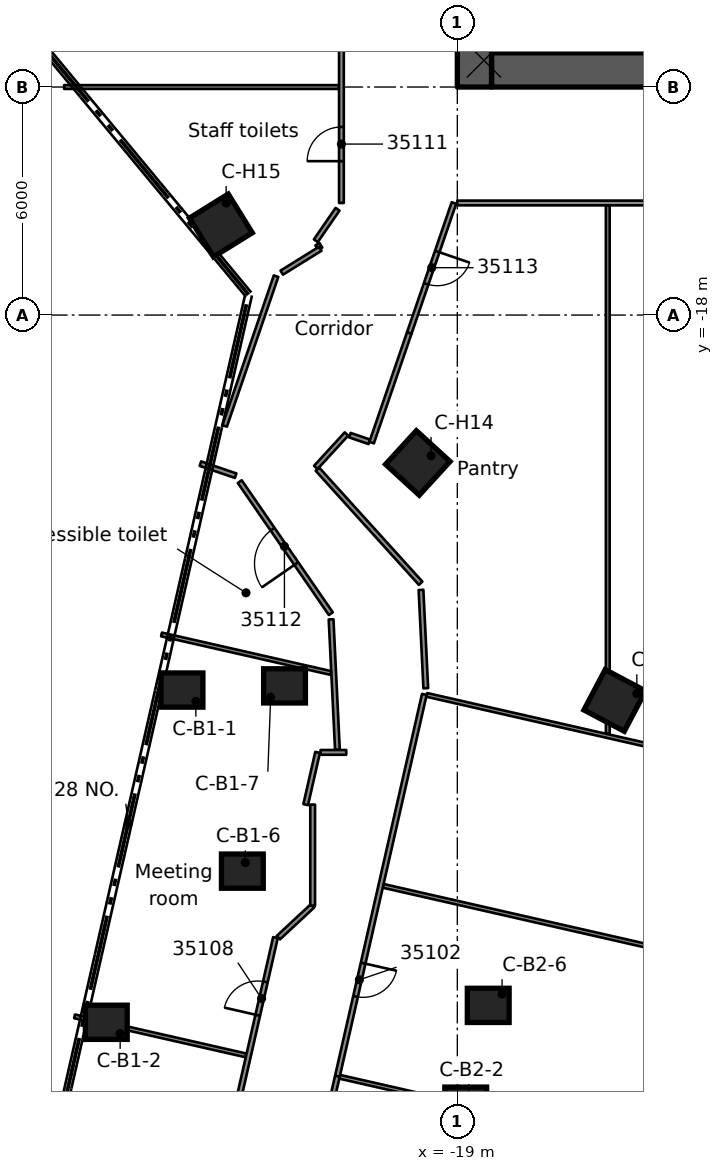
"""IFC4 building model, lengths in metres.
Left out: names, types, materials, properties, quantities, classifications, styles, units other than length and angle.
Written with IfcOpenShell. Run it as: python <this file> out.ifc"""

import sys

from ifc_helpers import new_model, si_unit, direction, frame, frame_2d, origin, origin_2d, place, context, subcontext, project, spatial, rectangle, extrude, element, fill, save


model = new_model("IFC4")
c1 = context("Model", 3, precision=1e-05, world=origin(), true_north=direction((0.0, 1.0)))
c2 = subcontext(c1, "Body", "Model", "MODEL_VIEW")
j1 = project(units=[si_unit("LENGTHUNIT", "METRE"), si_unit("PLANEANGLEUNIT", "RADIAN")], contexts=[c1])
p1 = place(None, origin())
s1 = spatial("IfcSite", under=j1, at=p1, CompositionType="ELEMENT")
p2 = place(p1, origin())
s2 = spatial("IfcBuilding", under=s1, at=p2, CompositionType="ELEMENT")
p3 = place(p2, frame((0.0, 0.0, 170.6)))
s3 = spatial("IfcBuildingStorey", under=s2, at=p3, CompositionType="ELEMENT", Elevation=170.6)
p4 = place(p3, frame((-18.1, -11.55, 0.0), z_axis=(0.0, 0.0, 1.0), x_axis=(1.0, 0.0, 0.0)))
e1 = element("IfcWall", 1, at=p4, inside=s3, PredefinedType="SHEAR", context=c2, shape_type="SweptSolid", body=[
    extrude(rectangle(XDim=9.2, YDim=0.9, at=frame_2d((4.6, 0.0))), origin(), (0.0, 0.0, 1.0), 3.5),
])
p5 = place(p4, frame((5.1, 0.0, 0.0)))
e2 = element("IfcOpeningElement", 2, at=p5, cuts=e1, PredefinedType="OPENING", context=c2, shape_type="SweptSolid", body=[
    extrude(rectangle(XDim=1.1, YDim=2.1, at=frame_2d((0.55, 1.05))), frame((0.0, 0.46, 0.0), z_axis=(0.0, -1.0, 0.0), x_axis=(1.0, 0.0, 0.0)), (0.0, 0.0, 1.0), 0.92),
])
p6 = place(p4, frame((7.53, 0.0, 0.0)))
e3 = element("IfcOpeningElement", 3, at=p6, cuts=e1, PredefinedType="OPENING", context=c2, shape_type="SweptSolid", body=[
    extrude(rectangle(XDim=0.9, YDim=2.1, at=frame_2d((0.45, 1.05))), frame((0.0, 0.46, 0.0), z_axis=(0.0, -1.0, 0.0), x_axis=(1.0, 0.0, 0.0)), (0.0, 0.0, 1.0), 0.92),
])
p7 = place(p3, frame((-18.55, -12.0, 0.0), z_axis=(0.0, 0.0, 1.0), x_axis=(0.0, 1.0, 0.0)))
e4 = element("IfcWall", 4, at=p7, inside=s3, PredefinedType="SHEAR", context=c2, shape_type="SweptSolid", body=[
    extrude(rectangle(XDim=24.0, YDim=0.9, at=frame_2d((12.0, 0.0))), origin(), (0.0, 0.0, 1.0), 3.5),
])
p8 = place(p7, frame((10.1, 0.0, 0.0)))
e5 = element("IfcOpeningElement", 5, at=p8, cuts=e4, PredefinedType="OPENING", context=c2, shape_type="SweptSolid", body=[
    extrude(rectangle(XDim=1.8, YDim=2.1, at=frame_2d((0.9, 1.05))), frame((0.0, 0.46, 0.0), z_axis=(0.0, -1.0, 0.0), x_axis=(1.0, 0.0, 0.0)), (0.0, 0.0, 1.0), 0.92),
])
for number, where, z_axis, x_axis in (
    (6, (-26.245, -27.867, 0.0), (0.0, 0.0, 1.0), (1.0, 0.0, 0.0)),
    (7, (-28.237, -36.609, 0.0), (0.0, 0.0, 1.0), (1.0, 0.0, 0.0)),
    (8, (-24.657, -32.632, 0.0), (0.0, 0.0, 1.0), (1.0, 0.0, 0.0)),
    (9, (-23.547, -27.757, 0.0), (0.0, 0.0, 1.0), (1.0, 0.0, 0.0)),
    (10, (-18.779, -38.764, 0.0), (0.0, 0.0, 1.0), (1.0, 0.0, 0.0)),
    (11, (-18.187, -36.164, 0.0), (0.0, 0.0, 1.0), (1.0, 0.0, 0.0)),
):
    element("IfcColumn", number, at=place(p3, frame(where, z_axis=z_axis, x_axis=x_axis)), inside=s3, PredefinedType="COLUMN", context=c2, shape_type="SweptSolid", body=[
        extrude(rectangle(XDim=1.1, YDim=0.9, at=origin_2d()), origin(), (0.0, 0.0, 1.0), 3.5),
    ])
for number, where, z_axis, x_axis in (
    (12, (-14.858, -28.141, 0.0), (0.0, 0.0, 1.0), (-0.467, -0.884, 0.0)),
    (13, (-20.04, -21.891, 0.0), (0.0, 0.0, 1.0), (-0.675, -0.738, 0.0)),
    (14, (-25.222, -15.642, 0.0), (0.0, 0.0, 1.0), (-0.85, -0.527, 0.0)),
):
    element("IfcColumn", number, at=place(p3, frame(where, z_axis=z_axis, x_axis=x_axis)), inside=s3, PredefinedType="COLUMN", context=c2, shape_type="SweptSolid", body=[
        extrude(rectangle(XDim=1.2, YDim=1.2, at=origin_2d()), origin(), (0.0, 0.0, 1.0), 3.5),
    ])
p9 = place(p3, frame((-22.322, -26.007, 0.0), z_axis=(0.0, 0.0, 1.0), x_axis=(0.048573949442, -0.998819589033, 0.0)))
e15 = element("IfcWall", 15, at=p9, inside=s3, PredefinedType="PARTITIONING", context=c2, shape_type="SweptSolid", body=[
    extrude(rectangle(XDim=3.438, YDim=0.125, at=frame_2d((1.719, 0.0))), origin(), (0.0, 0.0, 1.0), 3.06),
])
p10 = place(p3, frame((-19.956, -25.232, 0.0), z_axis=(0.0, 0.0, 1.0), x_axis=(0.048635402931, -0.998816598571, 0.0)))
e16 = element("IfcWall", 16, at=p10, inside=s3, PredefinedType="PARTITIONING", context=c2, shape_type="SweptSolid", body=[
    extrude(rectangle(XDim=2.59, YDim=0.125, at=frame_2d((1.295, 0.0))), origin(), (0.0, 0.0, 1.0), 3.06),
])
p11 = place(p3, frame((-22.682, -16.135, 0.0), z_axis=(0.0, 0.0, 1.0), x_axis=(0.530154156877, -0.847901273702, 0.0)))
e17 = element("IfcWall", 17, at=p11, inside=s3, PredefinedType="PARTITIONING", context=c2, shape_type="SweptSolid", body=[
    extrude(rectangle(XDim=0.141, YDim=0.125, at=frame_2d((0.071, 0.0))), origin(), (0.0, 0.0, 1.0), 3.06),
])
p12 = place(p3, frame((-22.329, -25.857, 0.0), z_axis=(0.0, 0.0, 1.0), x_axis=(-0.567768105219, 0.823188543832, 0.0)))
e18 = element("IfcWall", 18, at=p12, inside=s3, PredefinedType="PARTITIONING", context=c2, shape_type="SweptSolid", body=[
    extrude(rectangle(XDim=4.22, YDim=0.125, at=frame_2d((2.11, 0.0))), origin(), (0.0, 0.0, 1.0), 3.06),
])
p13 = place(p12, frame((1.6, 0.0, 0.0)))
e19 = element("IfcOpeningElement", 19, at=p13, cuts=e18, PredefinedType="OPENING", context=c2, shape_type="SweptSolid", body=[
    extrude(rectangle(XDim=1.1, YDim=2.1, at=frame_2d((0.55, 1.05))), frame((0.0, 0.073, 0.0), z_axis=(0.0, -1.0, 0.0), x_axis=(1.0, 0.0, 0.0)), (0.0, 0.0, 1.0), 0.145),
])
p14 = place(p3, frame((-19.965, -25.057, 0.0), z_axis=(0.0, 0.0, 1.0), x_axis=(-0.671014368504, 0.741444345356, 0.0)))
e20 = element("IfcWall", 20, at=p14, inside=s3, PredefinedType="PARTITIONING", context=c2, shape_type="SweptSolid", body=[
    extrude(rectangle(XDim=4.049, YDim=0.125, at=frame_2d((2.024, 0.0))), origin(), (0.0, 0.0, 1.0), 3.06),
])
p15 = place(p3, frame((-21.827, -21.16, 0.0), z_axis=(0.0, 0.0, 1.0), x_axis=(0.94566493533, -0.325142784155, 0.0)))
e21 = element("IfcWall", 21, at=p15, inside=s3, PredefinedType="PARTITIONING", context=c2, shape_type="SweptSolid", body=[
    extrude(rectangle(XDim=0.541, YDim=0.125, at=frame_2d((0.271, 0.0))), origin(), (0.0, 0.0, 1.0), 3.06),
])
p16 = place(p3, frame((-25.76, -21.91, 0.0), z_axis=(0.0, 0.0, 1.0), x_axis=(0.946161976611, -0.323693549544, 0.0)))
e22 = element("IfcWall", 22, at=p16, inside=s3, PredefinedType="PARTITIONING", context=c2, shape_type="SweptSolid", body=[
    extrude(rectangle(XDim=0.98, YDim=0.125, at=frame_2d((0.49, 0.0))), origin(), (0.0, 0.0, 1.0), 3.06),
])
p17 = place(p3, frame((-29.073, -36.453, 0.0), z_axis=(0.0, 0.0, 1.0), x_axis=(0.975041099452, -0.222024445455, 0.0)))
e23 = element("IfcWall", 23, at=p17, inside=s3, PredefinedType="PARTITIONING", context=c2, shape_type="SweptSolid", body=[
    extrude(rectangle(XDim=4.63, YDim=0.1, at=frame_2d((2.315, 0.0))), origin(), (0.0, 0.0, 1.0), 3.06),
])
p18 = place(p3, frame((-22.095, -38.043, 0.0), z_axis=(0.0, 0.0, 1.0), x_axis=(0.975023843859, -0.222100211404, 0.0)))
e24 = element("IfcWall", 24, at=p18, inside=s3, PredefinedType="PARTITIONING", context=c2, shape_type="SweptSolid", body=[
    extrude(rectangle(XDim=26.186, YDim=0.1, at=frame_2d((13.093, 0.0))), origin(), (0.0, 0.0, 1.0), 3.06),
])
p19 = place(p3, frame((-20.951, -33.019, 0.0), z_axis=(0.0, 0.0, 1.0), x_axis=(0.975025683381, -0.222092135715, 0.0)))
e25 = element("IfcWall", 25, at=p19, inside=s3, PredefinedType="PARTITIONING", context=c2, shape_type="SweptSolid", body=[
    extrude(rectangle(XDim=26.187, YDim=0.1, at=frame_2d((13.094, 0.0))), origin(), (0.0, 0.0, 1.0), 3.06),
])
p20 = place(p3, frame((-26.784, -26.404, 0.0), z_axis=(0.0, 0.0, 1.0), x_axis=(0.975064044209, -0.221923657346, 0.0)))
e26 = element("IfcWall", 26, at=p20, inside=s3, PredefinedType="PARTITIONING", context=c2, shape_type="SweptSolid", body=[
    extrude(rectangle(XDim=4.569, YDim=0.1, at=frame_2d((2.284, 0.0))), origin(), (0.0, 0.0, 1.0), 3.06),
])
p21 = place(p3, frame((-19.806, -27.994, 0.0), z_axis=(0.0, 0.0, 1.0), x_axis=(0.975005878079, -0.222179066769, 0.0)))
e27 = element("IfcWall", 27, at=p21, inside=s3, PredefinedType="PARTITIONING", context=c2, shape_type="SweptSolid", body=[
    extrude(rectangle(XDim=25.246, YDim=0.1, at=frame_2d((12.623, 0.0))), origin(), (0.0, 0.0, 1.0), 3.06),
])
p22 = place(p3, frame((-23.709, -34.381, 0.0), z_axis=(0.0, 0.0, 1.0), x_axis=(0.732207421562, 0.681081707147, 0.0)))
e28 = element("IfcWall", 28, at=p22, inside=s3, PredefinedType="PARTITIONING", context=c2, shape_type="SweptSolid", body=[
    extrude(rectangle(XDim=1.232, YDim=0.125, at=frame_2d((0.616, 0.0))), origin(), (0.0, 0.0, 1.0), 3.06),
])
p23 = place(p3, frame((-22.599, -29.507, 0.0), z_axis=(0.0, 0.0, 1.0), x_axis=(1.0, 0.0, 0.0)))
e29 = element("IfcWall", 29, at=p23, inside=s3, PredefinedType="PARTITIONING", context=c2, shape_type="SweptSolid", body=[
    extrude(rectangle(XDim=0.676, YDim=0.125, at=frame_2d((0.338, 0.0))), origin(), (0.0, 0.0, 1.0), 3.06),
])
p24 = place(p3, frame((-10.991, -15.051, 0.0), z_axis=(0.0, 0.0, 1.0), x_axis=(-1.0, 0.0, 0.0)))
e30 = element("IfcWall", 30, at=p24, inside=s3, PredefinedType="PARTITIONING", context=c2, shape_type="SweptSolid", body=[
    extrude(rectangle(XDim=8.01, YDim=0.125, at=frame_2d((4.005, 0.0))), origin(), (0.0, 0.0, 1.0), 3.06),
])
p25 = place(p24, frame((1.6, 0.0, 0.0)))
e31 = element("IfcOpeningElement", 31, at=p25, cuts=e30, PredefinedType="OPENING", context=c2, shape_type="SweptSolid", body=[
    extrude(rectangle(XDim=0.9, YDim=2.1, at=frame_2d((0.45, 1.05))), frame((0.0, 0.073, 0.0), z_axis=(0.0, -1.0, 0.0), x_axis=(1.0, 0.0, 0.0)), (0.0, 0.0, 1.0), 0.145),
])
p26 = place(p3, frame((-29.347, -12.0, 0.0), z_axis=(0.0, 0.0, 1.0), x_axis=(1.0, 0.0, 0.0)))
e32 = element("IfcWall", 32, at=p26, inside=s3, PredefinedType="PARTITIONING", context=c2, shape_type="SweptSolid", body=[
    extrude(rectangle(XDim=7.234, YDim=0.1, at=frame_2d((3.617, 0.0))), origin(), (0.0, 0.0, 1.0), 3.06),
])
p27 = place(p3, frame((-23.62, -16.884, 0.0), z_axis=(0.0, 0.0, 1.0), x_axis=(0.849535775132, 0.527531010245, 0.0)))
e33 = element("IfcWall", 33, at=p27, inside=s3, PredefinedType="PARTITIONING", context=c2, shape_type="SweptSolid", body=[
    extrude(rectangle(XDim=1.193, YDim=0.125, at=frame_2d((0.596, 0.0))), origin(), (0.0, 0.0, 1.0), 3.06),
])
p28 = place(p3, frame((-22.724, -22.009, 0.0), z_axis=(0.0, 0.0, 1.0), x_axis=(0.675881994125, 0.737009857477, 0.0)))
e34 = element("IfcWall", 34, at=p28, inside=s3, PredefinedType="PARTITIONING", context=c2, shape_type="SweptSolid", body=[
    extrude(rectangle(XDim=1.194, YDim=0.125, at=frame_2d((0.597, 0.0))), origin(), (0.0, 0.0, 1.0), 3.06),
])
p29 = place(p3, frame((-22.723, -16.045, 0.0), z_axis=(0.0, 0.0, 1.0), x_axis=(0.567177272103, 0.823595739431, 0.0)))
e35 = element("IfcWall", 35, at=p29, inside=s3, PredefinedType="PARTITIONING", context=c2, shape_type="SweptSolid", body=[
    extrude(rectangle(XDim=1.006, YDim=0.125, at=frame_2d((0.503, 0.0))), origin(), (0.0, 0.0, 1.0), 3.06),
])
p30 = place(p3, frame((-19.089, -15.051, 0.0), z_axis=(0.0, 0.0, 1.0), x_axis=(-0.32495907715, -0.945728078349, 0.0)))
e36 = element("IfcWall", 36, at=p30, inside=s3, PredefinedType="PARTITIONING", context=c2, shape_type="SweptSolid", body=[
    extrude(rectangle(XDim=3.618, YDim=0.125, at=frame_2d((1.809, 0.0))), origin(), (0.0, 0.0, 1.0), 3.06),
])
p31 = place(p30, frame((1.35, 0.0, 0.0)))
e37 = element("IfcOpeningElement", 37, at=p31, cuts=e36, PredefinedType="OPENING", context=c2, shape_type="SweptSolid", body=[
    extrude(rectangle(XDim=0.9, YDim=2.1, at=frame_2d((0.45, 1.05))), frame((0.0, 0.073, 0.0), z_axis=(0.0, -1.0, 0.0), x_axis=(1.0, 0.0, 0.0)), (0.0, 0.0, 1.0), 0.145),
])
p32 = place(p3, frame((-21.255, -21.356, 0.0), z_axis=(0.0, 0.0, 1.0), x_axis=(0.324768620484, 0.94579349921, 0.0)))
e38 = element("IfcWall", 38, at=p32, inside=s3, PredefinedType="PARTITIONING", context=c2, shape_type="SweptSolid", body=[
    extrude(rectangle(XDim=3.048, YDim=0.125, at=frame_2d((1.524, 0.0))), origin(), (0.0, 0.0, 1.0), 3.06),
])
p33 = place(p3, frame((-25.123, -20.917, 0.0), z_axis=(0.0, 0.0, 1.0), x_axis=(0.324794759411, 0.945784523165, 0.0)))
e39 = element("IfcWall", 39, at=p33, inside=s3, PredefinedType="PARTITIONING", context=c2, shape_type="SweptSolid", body=[
    extrude(rectangle(XDim=4.166, YDim=0.125, at=frame_2d((2.083, 0.0))), origin(), (0.0, 0.0, 1.0), 3.06),
])
p34 = place(p3, frame((-19.868, -27.982, 0.0), z_axis=(0.0, 0.0, 1.0), x_axis=(-0.222050161604, -0.975035243328, 0.0)))
e40 = element("IfcWall", 40, at=p34, inside=s3, PredefinedType="PARTITIONING", context=c2, shape_type="SweptSolid", body=[
    extrude(rectangle(XDim=10.304, YDim=0.125, at=frame_2d((5.152, 0.0))), origin(), (0.0, 0.0, 1.0), 3.06),
])
p35 = place(p34, frame((7.252, 0.0, 0.0)))
e41 = element("IfcOpeningElement", 41, at=p35, cuts=e40, PredefinedType="OPENING", context=c2, shape_type="SweptSolid", body=[
    extrude(rectangle(XDim=0.9, YDim=2.1, at=frame_2d((0.45, 1.05))), frame((0.0, 0.073, 0.0), z_axis=(0.0, -1.0, 0.0), x_axis=(1.0, 0.0, 0.0)), (0.0, 0.0, 1.0), 0.145),
])
p36 = place(p3, frame((-22.488, -39.488, 0.0), z_axis=(0.0, 0.0, 1.0), x_axis=(0.221903185503, 0.975068703356, 0.0)))
e42 = element("IfcWall", 42, at=p36, inside=s3, PredefinedType="PARTITIONING", context=c2, shape_type="SweptSolid", body=[
    extrude(rectangle(XDim=1.496, YDim=0.125, at=frame_2d((0.748, 0.0))), origin(), (0.0, 0.0, 1.0), 3.06),
])
p37 = place(p3, frame((-27.118, -49.001, 0.0), z_axis=(0.0, 0.0, 1.0), x_axis=(0.222212898452, 0.974998168081, 0.0)))
e43 = element("IfcWall", 43, at=p37, inside=s3, PredefinedType="PARTITIONING", context=c2, shape_type="SweptSolid", body=[
    extrude(rectangle(XDim=14.995, YDim=0.125, at=frame_2d((7.498, 0.0))), origin(), (0.0, 0.0, 1.0), 3.06),
])
p38 = place(p37, frame((12.901, 0.0, 0.0)))
e44 = element("IfcOpeningElement", 44, at=p38, cuts=e43, PredefinedType="OPENING", context=c2, shape_type="SweptSolid", body=[
    extrude(rectangle(XDim=0.9, YDim=2.1, at=frame_2d((0.45, 1.05))), frame((0.0, 0.073, 0.0), z_axis=(0.0, -1.0, 0.0), x_axis=(1.0, 0.0, 0.0)), (0.0, 0.0, 1.0), 0.145),
])
p39 = place(p3, frame((-22.99, -30.882, 0.0), z_axis=(0.0, 0.0, 1.0), x_axis=(0.221950340639, 0.975057970733, 0.0)))
e45 = element("IfcWall", 45, at=p39, inside=s3, PredefinedType="PARTITIONING", context=c2, shape_type="SweptSolid", body=[
    extrude(rectangle(XDim=1.41, YDim=0.125, at=frame_2d((0.705, 0.0))), origin(), (0.0, 0.0, 1.0), 3.06),
])
p40 = place(p3, frame((-15.041, -29.016, 0.0), z_axis=(0.0, 0.0, 1.0), x_axis=(0.0, 1.0, 0.0)))
e46 = element("IfcWall", 46, at=p40, inside=s3, PredefinedType="PARTITIONING", context=c2, shape_type="SweptSolid", body=[
    extrude(rectangle(XDim=13.902, YDim=0.1, at=frame_2d((6.951, 0.0))), origin(), (0.0, 0.0, 1.0), 3.06),
])
p41 = place(p3, frame((-22.05, -15.051, 0.0), z_axis=(0.0, 0.0, 1.0), x_axis=(0.0, 1.0, 0.0)))
e47 = element("IfcWall", 47, at=p41, inside=s3, PredefinedType="PARTITIONING", context=c2, shape_type="SweptSolid", body=[
    extrude(rectangle(XDim=30.102, YDim=0.125, at=frame_2d((15.051, 0.0))), origin(), (0.0, 0.0, 1.0), 3.06),
])
p42 = place(p41, frame((10.401, 0.0, 0.0)))
e48 = element("IfcOpeningElement", 48, at=p42, cuts=e47, PredefinedType="OPENING", context=c2, shape_type="SweptSolid", body=[
    extrude(rectangle(XDim=0.9, YDim=2.1, at=frame_2d((0.45, 1.05))), frame((0.0, 0.073, 0.0), z_axis=(0.0, -1.0, 0.0), x_axis=(1.0, 0.0, 0.0)), (0.0, 0.0, 1.0), 0.145),
])
p43 = place(p41, frame((14.651, 0.0, 0.0)))
e49 = element("IfcOpeningElement", 49, at=p43, cuts=e47, PredefinedType="OPENING", context=c2, shape_type="SweptSolid", body=[
    extrude(rectangle(XDim=0.9, YDim=2.1, at=frame_2d((0.45, 1.05))), frame((0.0, 0.073, 0.0), z_axis=(0.0, -1.0, 0.0), x_axis=(1.0, 0.0, 0.0)), (0.0, 0.0, 1.0), 0.145),
])
p44 = place(p41, frame((1.1, 0.0, 0.0)))
e50 = element("IfcOpeningElement", 50, at=p44, cuts=e47, PredefinedType="OPENING", context=c2, shape_type="SweptSolid", body=[
    extrude(rectangle(XDim=0.9, YDim=2.1, at=frame_2d((0.45, 1.05))), frame((0.0, 0.073, 0.0), z_axis=(0.0, -1.0, 0.0), x_axis=(1.0, 0.0, 0.0)), (0.0, 0.0, 1.0), 0.145),
])
p45 = place(p3, frame((-22.807, -33.542, 0.0), z_axis=(0.0, 0.0, 1.0), x_axis=(0.0, 1.0, 0.0)))
e51 = element("IfcWall", 51, at=p45, inside=s3, PredefinedType="PARTITIONING", context=c2, shape_type="SweptSolid", body=[
    extrude(rectangle(XDim=2.66, YDim=0.125, at=frame_2d((1.33, 0.0))), origin(), (0.0, 0.0, 1.0), 3.06),
])
p46 = place(p35, origin())
e52 = element("IfcDoor", 52, at=p46, inside=s3, OperationType="SINGLE_SWING_RIGHT", PredefinedType="DOOR", context=c2, shape_type="SweptSolid", body=[
    extrude(rectangle(XDim=0.9, YDim=2.1, at=frame_2d((0.45, 1.05))), frame((0.0, 0.025, 0.0), z_axis=(0.0, -1.0, 0.0), x_axis=(1.0, 0.0, 0.0)), (0.0, 0.0, 1.0), 0.05),
])
fill(e41, e52)
p47 = place(p38, origin())
e53 = element("IfcDoor", 53, at=p47, inside=s3, OperationType="SINGLE_SWING_RIGHT", PredefinedType="DOOR", context=c2, shape_type="SweptSolid", body=[
    extrude(rectangle(XDim=0.9, YDim=2.1, at=frame_2d((0.45, 1.05))), frame((0.0, 0.025, 0.0), z_axis=(0.0, -1.0, 0.0), x_axis=(1.0, 0.0, 0.0)), (0.0, 0.0, 1.0), 0.05),
])
fill(e44, e53)
p48 = place(p44, origin())
e54 = element("IfcDoor", 54, at=p48, inside=s3, OperationType="SINGLE_SWING_LEFT", PredefinedType="DOOR", context=c2, shape_type="SweptSolid", body=[
    extrude(rectangle(XDim=0.9, YDim=2.1, at=frame_2d((0.45, 1.05))), frame((0.0, 0.025, 0.0), z_axis=(0.0, -1.0, 0.0), x_axis=(1.0, 0.0, 0.0)), (0.0, 0.0, 1.0), 0.05),
])
fill(e50, e54)
p49 = place(p13, origin())
e55 = element("IfcDoor", 55, at=p49, inside=s3, OperationType="SINGLE_SWING_RIGHT", PredefinedType="DOOR", context=c2, shape_type="SweptSolid", body=[
    extrude(rectangle(XDim=1.1, YDim=2.1, at=frame_2d((0.55, 1.05))), frame((0.0, 0.025, 0.0), z_axis=(0.0, -1.0, 0.0), x_axis=(1.0, 0.0, 0.0)), (0.0, 0.0, 1.0), 0.05),
])
fill(e19, e55)
p50 = place(p31, origin())
e56 = element("IfcDoor", 56, at=p50, inside=s3, OperationType="SINGLE_SWING_LEFT", PredefinedType="DOOR", context=c2, shape_type="SweptSolid", body=[
    extrude(rectangle(XDim=0.9, YDim=2.1, at=frame_2d((0.45, 1.05))), frame((0.0, 0.025, 0.0), z_axis=(0.0, -1.0, 0.0), x_axis=(1.0, 0.0, 0.0)), (0.0, 0.0, 1.0), 0.05),
])
fill(e37, e56)
save(model, sys.argv[1])
